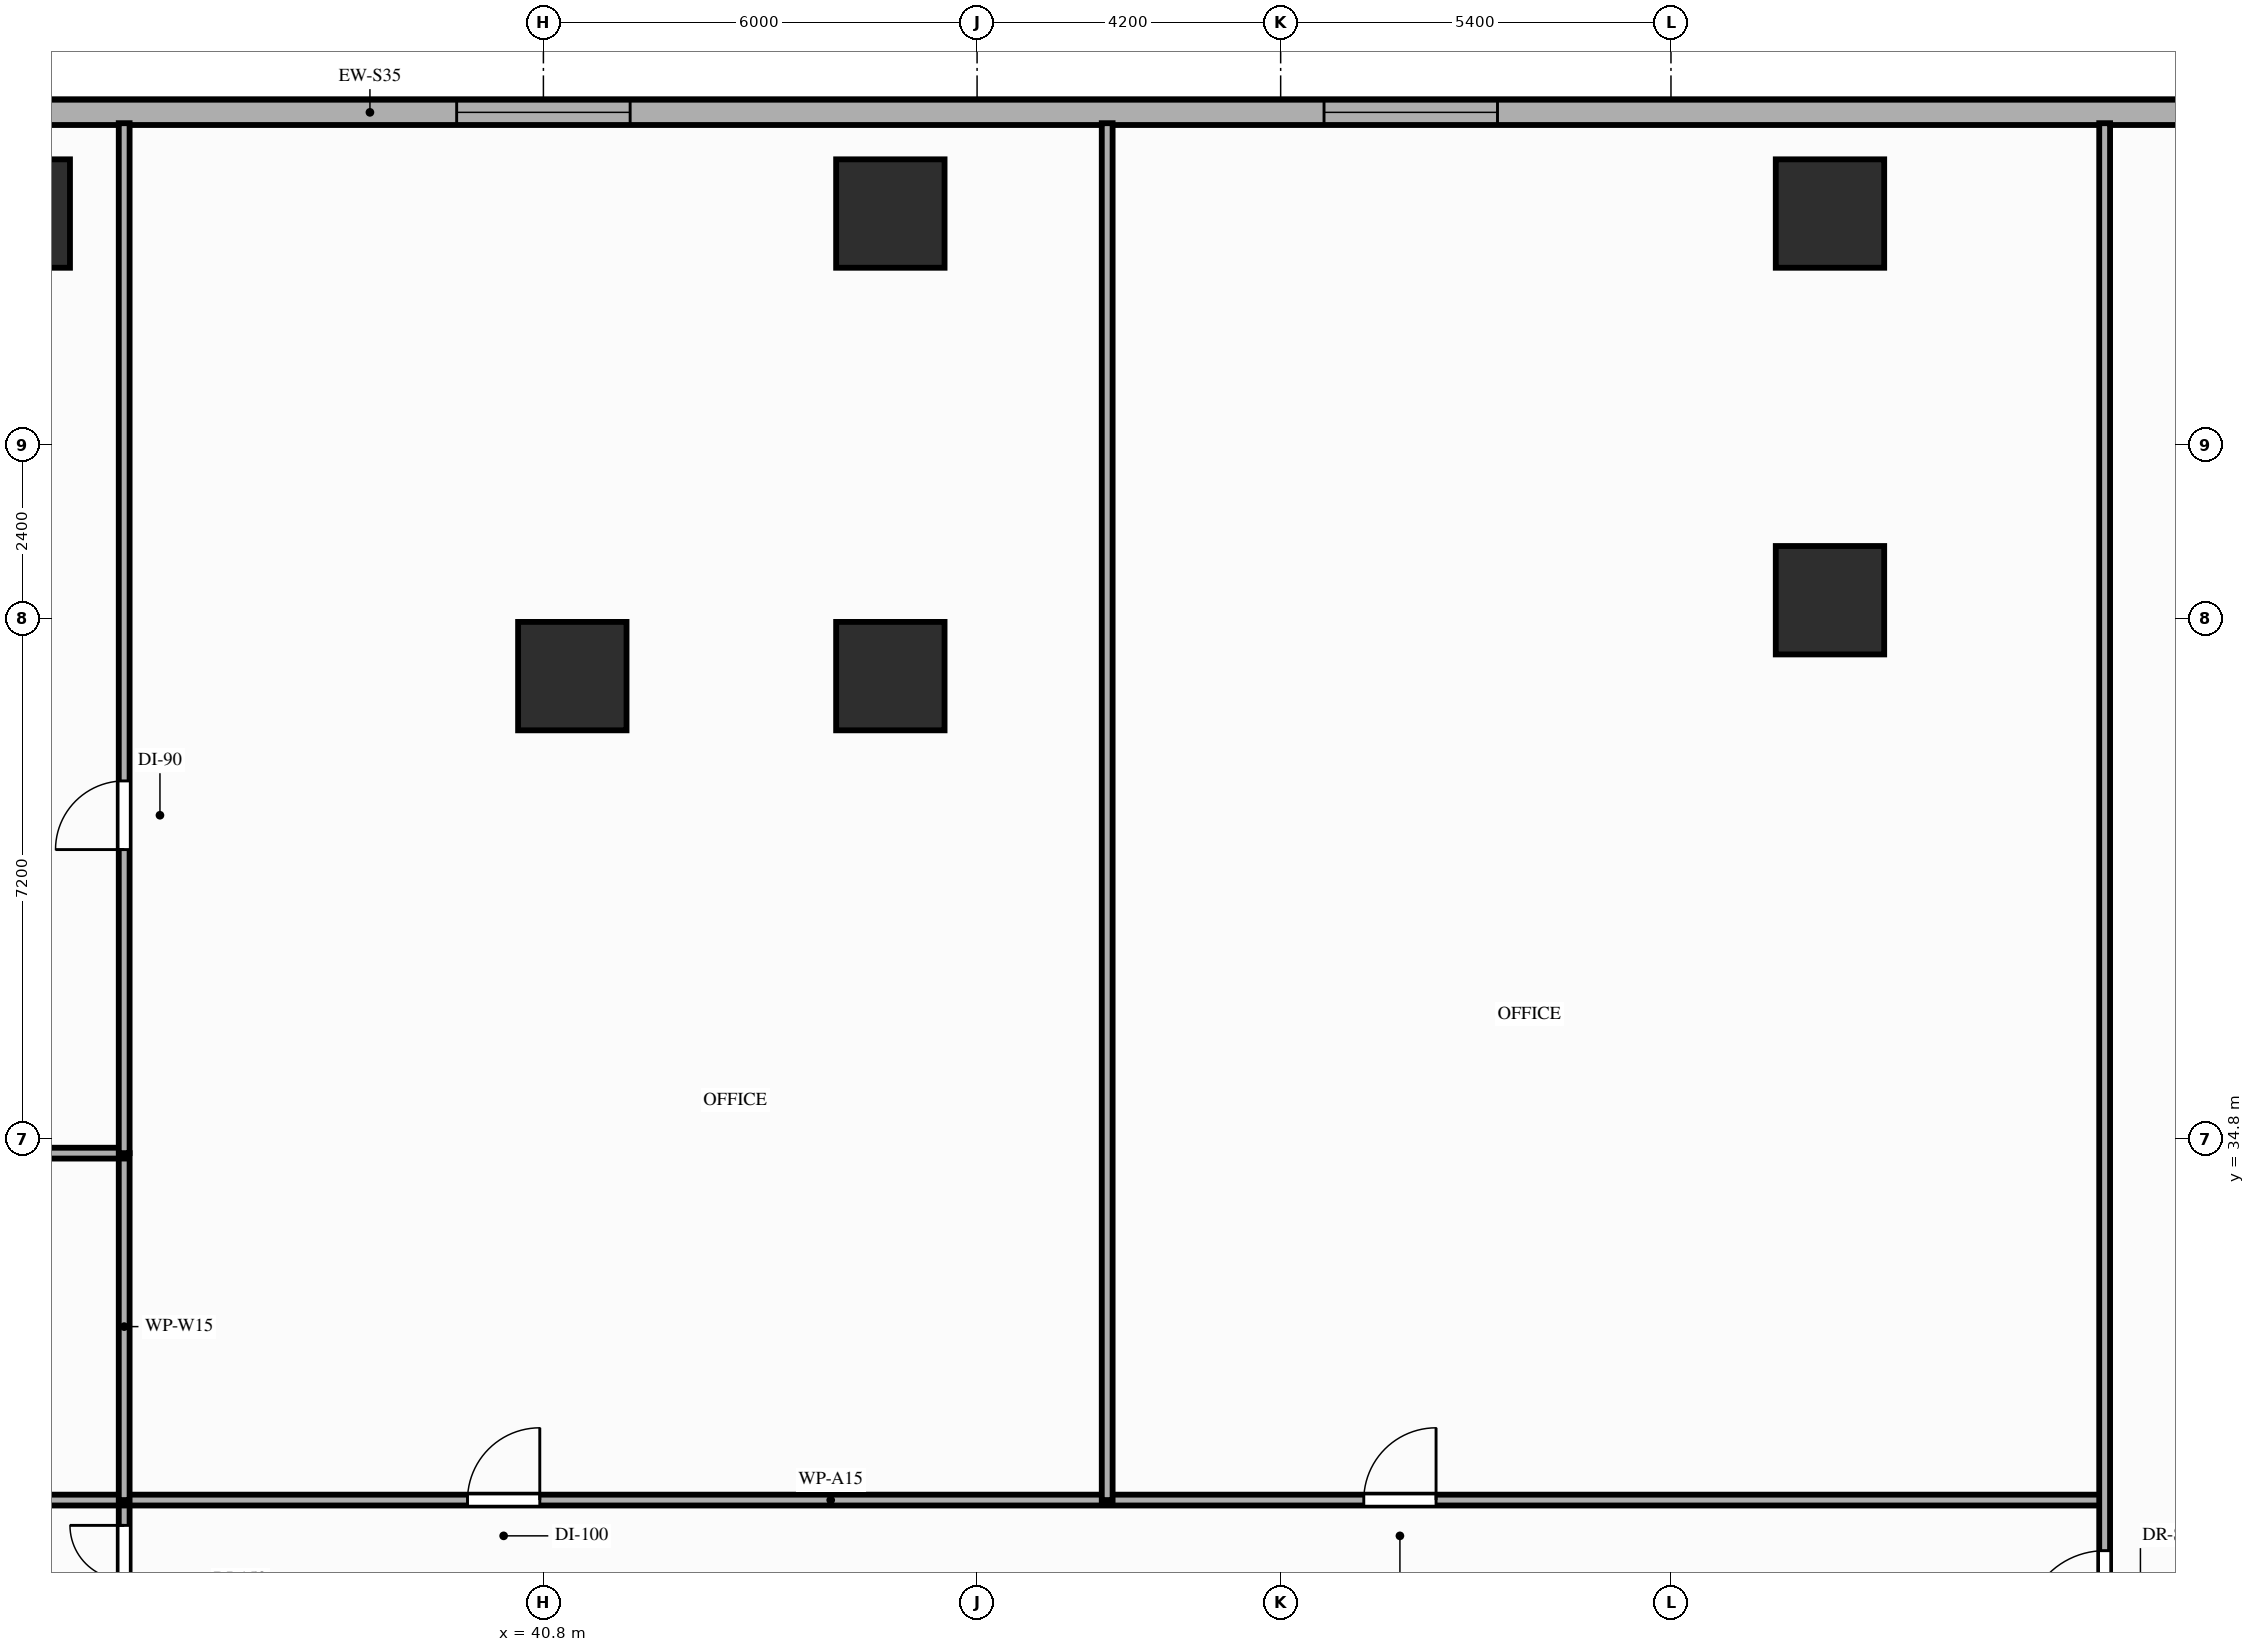
"""IFC4 building model, lengths in metres.
Left out: names, types, materials, properties, quantities, classifications, styles, units other than length and angle.
Written with IfcOpenShell. Run it as: python <this file> out.ifc"""

import sys

from ifc_helpers import new_model, si_unit, direction, frame, frame_2d, origin, origin_2d, place, context, subcontext, project, spatial, rectangle, extrude, element, fill, save


model = new_model("IFC4")
c1 = context("Model", 3, precision=1e-05, world=origin(), true_north=direction((0.0, 1.0)))
c2 = subcontext(c1, "Body", "Model", "MODEL_VIEW")
j1 = project(units=[si_unit("LENGTHUNIT", "METRE"), si_unit("PLANEANGLEUNIT", "RADIAN")], contexts=[c1])
p1 = place(None, origin())
s1 = spatial("IfcSite", under=j1, at=p1, CompositionType="ELEMENT")
p2 = place(p1, origin())
s2 = spatial("IfcBuilding", under=s1, at=p2, CompositionType="ELEMENT")
p3 = place(p2, frame((0.0, 0.0, 17.6)))
s3 = spatial("IfcBuildingStorey", under=s2, at=p3, CompositionType="ELEMENT", Elevation=17.6)
for number, where, z_axis, x_axis in (
    (1, (41.2, 41.2, 0.0), (0.0, 0.0, 1.0), (1.0, 0.0, 0.0)),
    (2, (45.6, 41.2, 0.0), (0.0, 0.0, 1.0), (1.0, 0.0, 0.0)),
    (3, (58.6, 42.25, 0.0), (0.0, 0.0, 1.0), (1.0, 0.0, 0.0)),
    (4, (33.5, 47.6, 0.0), (0.0, 0.0, 1.0), (1.0, 0.0, 0.0)),
    (5, (45.6, 47.6, 0.0), (0.0, 0.0, 1.0), (1.0, 0.0, 0.0)),
    (6, (58.6, 47.6, 0.0), (0.0, 0.0, 1.0), (1.0, 0.0, 0.0)),
):
    element("IfcColumn", number, at=place(p3, frame(where, z_axis=z_axis, x_axis=x_axis)), inside=s3, PredefinedType="COLUMN", context=c2, shape_type="SweptSolid", body=[
        extrude(rectangle(XDim=1.5, YDim=1.5, at=origin_2d()), origin(), (0.0, 0.0, 1.0), 4.2),
    ])
p4 = place(p3, frame((73.2, 49.0, 0.0), z_axis=(0.0, 0.0, 1.0), x_axis=(-1.0, 0.0, 0.0)))
e7 = element("IfcWall", 7, at=p4, inside=s3, PredefinedType="STANDARD", context=c2, shape_type="SweptSolid", body=[
    extrude(rectangle(XDim=69.6, YDim=0.35, at=frame_2d((34.8, 0.0))), origin(), (0.0, 0.0, 1.0), 3.9),
])
p5 = place(p4, frame((3.4, 0.0, 0.9)))
e8 = element("IfcOpeningElement", 8, at=p5, cuts=e7, PredefinedType="OPENING", context=c2, shape_type="SweptSolid", body=[
    extrude(rectangle(XDim=2.4, YDim=2.15, at=frame_2d((1.2, 1.075))), frame((0.0, 0.185, 0.0), z_axis=(0.0, -1.0, 0.0), x_axis=(1.0, 0.0, 0.0)), (0.0, 0.0, 1.0), 0.37),
])
p6 = place(p4, frame((19.2, 0.0, 0.9)))
e9 = element("IfcOpeningElement", 9, at=p6, cuts=e7, PredefinedType="OPENING", context=c2, shape_type="SweptSolid", body=[
    extrude(rectangle(XDim=2.4, YDim=2.15, at=frame_2d((1.2, 1.075))), frame((0.0, 0.185, 0.0), z_axis=(0.0, -1.0, 0.0), x_axis=(1.0, 0.0, 0.0)), (0.0, 0.0, 1.0), 0.37),
])
p7 = place(p4, frame((31.2, 0.0, 0.9)))
e10 = element("IfcOpeningElement", 10, at=p7, cuts=e7, PredefinedType="OPENING", context=c2, shape_type="SweptSolid", body=[
    extrude(rectangle(XDim=2.4, YDim=2.15, at=frame_2d((1.2, 1.075))), frame((0.0, 0.185, 0.0), z_axis=(0.0, -1.0, 0.0), x_axis=(1.0, 0.0, 0.0)), (0.0, 0.0, 1.0), 0.37),
])
p8 = place(p4, frame((43.4, 0.0, 0.9)))
e11 = element("IfcOpeningElement", 11, at=p8, cuts=e7, PredefinedType="OPENING", context=c2, shape_type="SweptSolid", body=[
    extrude(rectangle(XDim=2.4, YDim=2.15, at=frame_2d((1.2, 1.075))), frame((0.0, 0.185, 0.0), z_axis=(0.0, -1.0, 0.0), x_axis=(1.0, 0.0, 0.0)), (0.0, 0.0, 1.0), 0.37),
])
p9 = place(p4, frame((55.6, 0.0, 0.9)))
e12 = element("IfcOpeningElement", 12, at=p9, cuts=e7, PredefinedType="OPENING", context=c2, shape_type="SweptSolid", body=[
    extrude(rectangle(XDim=2.4, YDim=2.15, at=frame_2d((1.2, 1.075))), frame((0.0, 0.185, 0.0), z_axis=(0.0, -1.0, 0.0), x_axis=(1.0, 0.0, 0.0)), (0.0, 0.0, 1.0), 0.37),
])
p10 = place(p3, frame((35.0, 27.6, 0.0), z_axis=(0.0, 0.0, 1.0), x_axis=(0.0, 1.0, 0.0)))
e13 = element("IfcWall", 13, at=p10, inside=s3, PredefinedType="PARTITIONING", context=c2, shape_type="SweptSolid", body=[
    extrude(rectangle(XDim=2.2, YDim=0.15, at=frame_2d((1.1, 0.0))), origin(), (0.0, 0.0, 1.0), 3.18),
])
p11 = place(p10, frame((0.35, 0.0, 0.0)))
e14 = element("IfcOpeningElement", 14, at=p11, cuts=e13, PredefinedType="OPENING", context=c2, shape_type="SweptSolid", body=[
    extrude(rectangle(XDim=1.5, YDim=2.18, at=frame_2d((0.75, 1.09))), frame((0.0, 0.085, 0.0), z_axis=(0.0, -1.0, 0.0), x_axis=(1.0, 0.0, 0.0)), (0.0, 0.0, 1.0), 0.17),
])
p12 = place(p3, frame((27.15, 29.8, 0.0), z_axis=(0.0, 0.0, 1.0), x_axis=(1.0, 0.0, 0.0)))
e15 = element("IfcWall", 15, at=p12, inside=s3, PredefinedType="PARTITIONING", context=c2, shape_type="SweptSolid", body=[
    extrude(rectangle(XDim=35.25, YDim=0.15, at=frame_2d((17.625, 0.0))), origin(), (0.0, 0.0, 1.0), 3.18),
])
p13 = place(p12, frame((25.0, 0.0, 0.0)))
e16 = element("IfcOpeningElement", 16, at=p13, cuts=e15, PredefinedType="OPENING", context=c2, shape_type="SweptSolid", body=[
    extrude(rectangle(XDim=1.0, YDim=2.15, at=frame_2d((0.5, 1.075))), frame((0.0, 0.085, 0.0), z_axis=(0.0, -1.0, 0.0), x_axis=(1.0, 0.0, 0.0)), (0.0, 0.0, 1.0), 0.17),
])
p14 = place(p12, frame((1.4, 0.0, 0.0)))
e17 = element("IfcOpeningElement", 17, at=p14, cuts=e15, PredefinedType="OPENING", context=c2, shape_type="SweptSolid", body=[
    extrude(rectangle(XDim=0.85, YDim=2.1, at=frame_2d((0.425, 1.05))), frame((0.0, 0.085, 0.0), z_axis=(0.0, -1.0, 0.0), x_axis=(1.0, 0.0, 0.0)), (0.0, 0.0, 1.0), 0.17),
])
p15 = place(p12, frame((5.4, 0.0, 0.0)))
e18 = element("IfcOpeningElement", 18, at=p15, cuts=e15, PredefinedType="OPENING", context=c2, shape_type="SweptSolid", body=[
    extrude(rectangle(XDim=0.95, YDim=2.1, at=frame_2d((0.475, 1.05))), frame((0.0, 0.085, 0.0), z_axis=(0.0, -1.0, 0.0), x_axis=(1.0, 0.0, 0.0)), (0.0, 0.0, 1.0), 0.17),
])
p16 = place(p12, frame((12.6, 0.0, 0.0)))
e19 = element("IfcOpeningElement", 19, at=p16, cuts=e15, PredefinedType="OPENING", context=c2, shape_type="SweptSolid", body=[
    extrude(rectangle(XDim=1.0, YDim=2.15, at=frame_2d((0.5, 1.075))), frame((0.0, 0.085, 0.0), z_axis=(0.0, -1.0, 0.0), x_axis=(1.0, 0.0, 0.0)), (0.0, 0.0, 1.0), 0.17),
])
p17 = place(p3, frame((35.0, 29.8, 0.0), z_axis=(0.0, 0.0, 1.0), x_axis=(0.0, 1.0, 0.0)))
e20 = element("IfcWall", 20, at=p17, inside=s3, PredefinedType="PARTITIONING", context=c2, shape_type="SweptSolid", body=[
    extrude(rectangle(XDim=4.8, YDim=0.15, at=frame_2d((2.4, 0.0))), origin(), (0.0, 0.0, 1.0), 3.9),
])
p18 = place(p3, frame((27.15, 34.6, 0.0), z_axis=(0.0, 0.0, 1.0), x_axis=(1.0, 0.0, 0.0)))
e21 = element("IfcWall", 21, at=p18, inside=s3, PredefinedType="PARTITIONING", context=c2, shape_type="SweptSolid", body=[
    extrude(rectangle(XDim=7.85, YDim=0.15, at=frame_2d((3.925, 0.0))), origin(), (0.0, 0.0, 1.0), 3.18),
])
p19 = place(p3, frame((35.0, 34.6, 0.0), z_axis=(0.0, 0.0, 1.0), x_axis=(0.0, 1.0, 0.0)))
e22 = element("IfcWall", 22, at=p19, inside=s3, PredefinedType="PARTITIONING", context=c2, shape_type="SweptSolid", body=[
    extrude(rectangle(XDim=14.25, YDim=0.15, at=frame_2d((7.125, 0.0))), origin(), (0.0, 0.0, 1.0), 3.18),
])
p20 = place(p19, frame((4.2, 0.0, 0.0)))
e23 = element("IfcOpeningElement", 23, at=p20, cuts=e22, PredefinedType="OPENING", context=c2, shape_type="SweptSolid", body=[
    extrude(rectangle(XDim=0.95, YDim=2.15, at=frame_2d((0.475, 1.075))), frame((0.0, 0.085, 0.0), z_axis=(0.0, -1.0, 0.0), x_axis=(1.0, 0.0, 0.0)), (0.0, 0.0, 1.0), 0.17),
])
p21 = place(p3, frame((48.6, 29.8, 0.0), z_axis=(0.0, 0.0, 1.0), x_axis=(0.0, 1.0, 0.0)))
e24 = element("IfcWall", 24, at=p21, inside=s3, PredefinedType="PARTITIONING", context=c2, shape_type="SweptSolid", body=[
    extrude(rectangle(XDim=19.05, YDim=0.15, at=frame_2d((9.525, 0.0))), origin(), (0.0, 0.0, 1.0), 3.9),
])
p22 = place(p3, frame((62.4, 21.8, 0.0), z_axis=(0.0, 0.0, 1.0), x_axis=(0.0, 1.0, 0.0)))
e25 = element("IfcWall", 25, at=p22, inside=s3, PredefinedType="PARTITIONING", context=c2, shape_type="SweptSolid", body=[
    extrude(rectangle(XDim=27.05, YDim=0.15, at=frame_2d((13.525, 0.0))), origin(), (0.0, 0.0, 1.0), 3.18),
])
p23 = place(p22, frame((6.2, 0.0, 0.0)))
e26 = element("IfcOpeningElement", 26, at=p23, cuts=e25, PredefinedType="OPENING", context=c2, shape_type="SweptSolid", body=[
    extrude(rectangle(XDim=1.1, YDim=2.15, at=frame_2d((0.55, 1.075))), frame((0.0, 0.085, 0.0), z_axis=(0.0, -1.0, 0.0), x_axis=(1.0, 0.0, 0.0)), (0.0, 0.0, 1.0), 0.17),
])
p24 = place(p6, origin())
e27 = element("IfcWindow", 27, at=p24, inside=s3, PartitioningType="SINGLE_PANEL", PredefinedType="WINDOW", context=c2, shape_type="SweptSolid", body=[
    extrude(rectangle(XDim=2.4, YDim=2.15, at=frame_2d((1.2, 1.075))), frame((0.0, 0.03, 0.0), z_axis=(0.0, -1.0, 0.0), x_axis=(1.0, 0.0, 0.0)), (0.0, 0.0, 1.0), 0.06),
])
fill(e9, e27)
p25 = place(p7, origin())
e28 = element("IfcWindow", 28, at=p25, inside=s3, PartitioningType="SINGLE_PANEL", PredefinedType="WINDOW", context=c2, shape_type="SweptSolid", body=[
    extrude(rectangle(XDim=2.4, YDim=2.15, at=frame_2d((1.2, 1.075))), frame((0.0, 0.03, 0.0), z_axis=(0.0, -1.0, 0.0), x_axis=(1.0, 0.0, 0.0)), (0.0, 0.0, 1.0), 0.06),
])
fill(e10, e28)
p26 = place(p13, origin())
e29 = element("IfcDoor", 29, at=p26, inside=s3, OperationType="SINGLE_SWING_RIGHT", PredefinedType="DOOR", context=c2, shape_type="SweptSolid", body=[
    extrude(rectangle(XDim=1.0, YDim=2.15, at=frame_2d((0.5, 1.075))), frame((0.0, 0.025, 0.0), z_axis=(0.0, -1.0, 0.0), x_axis=(1.0, 0.0, 0.0)), (0.0, 0.0, 1.0), 0.05),
])
fill(e16, e29)
p27 = place(p11, origin())
e30 = element("IfcDoor", 30, at=p27, inside=s3, OperationType="DOUBLE_DOOR_SINGLE_SWING", PredefinedType="DOOR", context=c2, shape_type="SweptSolid", body=[
    extrude(rectangle(XDim=1.5, YDim=2.18, at=frame_2d((0.75, 1.09))), frame((0.0, 0.025, 0.0), z_axis=(0.0, -1.0, 0.0), x_axis=(1.0, 0.0, 0.0)), (0.0, 0.0, 1.0), 0.05),
])
fill(e14, e30)
p28 = place(p23, origin())
e31 = element("IfcDoor", 31, at=p28, inside=s3, OperationType="SINGLE_SWING_LEFT", PredefinedType="DOOR", context=c2, shape_type="SweptSolid", body=[
    extrude(rectangle(XDim=1.1, YDim=2.15, at=frame_2d((0.55, 1.075))), frame((0.0, 0.025, 0.0), z_axis=(0.0, -1.0, 0.0), x_axis=(1.0, 0.0, 0.0)), (0.0, 0.0, 1.0), 0.05),
])
fill(e26, e31)
p29 = place(p16, origin())
e32 = element("IfcDoor", 32, at=p29, inside=s3, OperationType="SINGLE_SWING_RIGHT", PredefinedType="DOOR", context=c2, shape_type="SweptSolid", body=[
    extrude(rectangle(XDim=1.0, YDim=2.15, at=frame_2d((0.5, 1.075))), frame((0.0, 0.025, 0.0), z_axis=(0.0, -1.0, 0.0), x_axis=(1.0, 0.0, 0.0)), (0.0, 0.0, 1.0), 0.05),
])
fill(e19, e32)
p30 = place(p20, origin())
e33 = element("IfcDoor", 33, at=p30, inside=s3, OperationType="SINGLE_SWING_LEFT", PredefinedType="DOOR", context=c2, shape_type="SweptSolid", body=[
    extrude(rectangle(XDim=0.95, YDim=2.15, at=frame_2d((0.475, 1.075))), frame((0.0, 0.025, 0.0), z_axis=(0.0, -1.0, 0.0), x_axis=(1.0, 0.0, 0.0)), (0.0, 0.0, 1.0), 0.05),
])
fill(e23, e33)
save(model, sys.argv[1])
